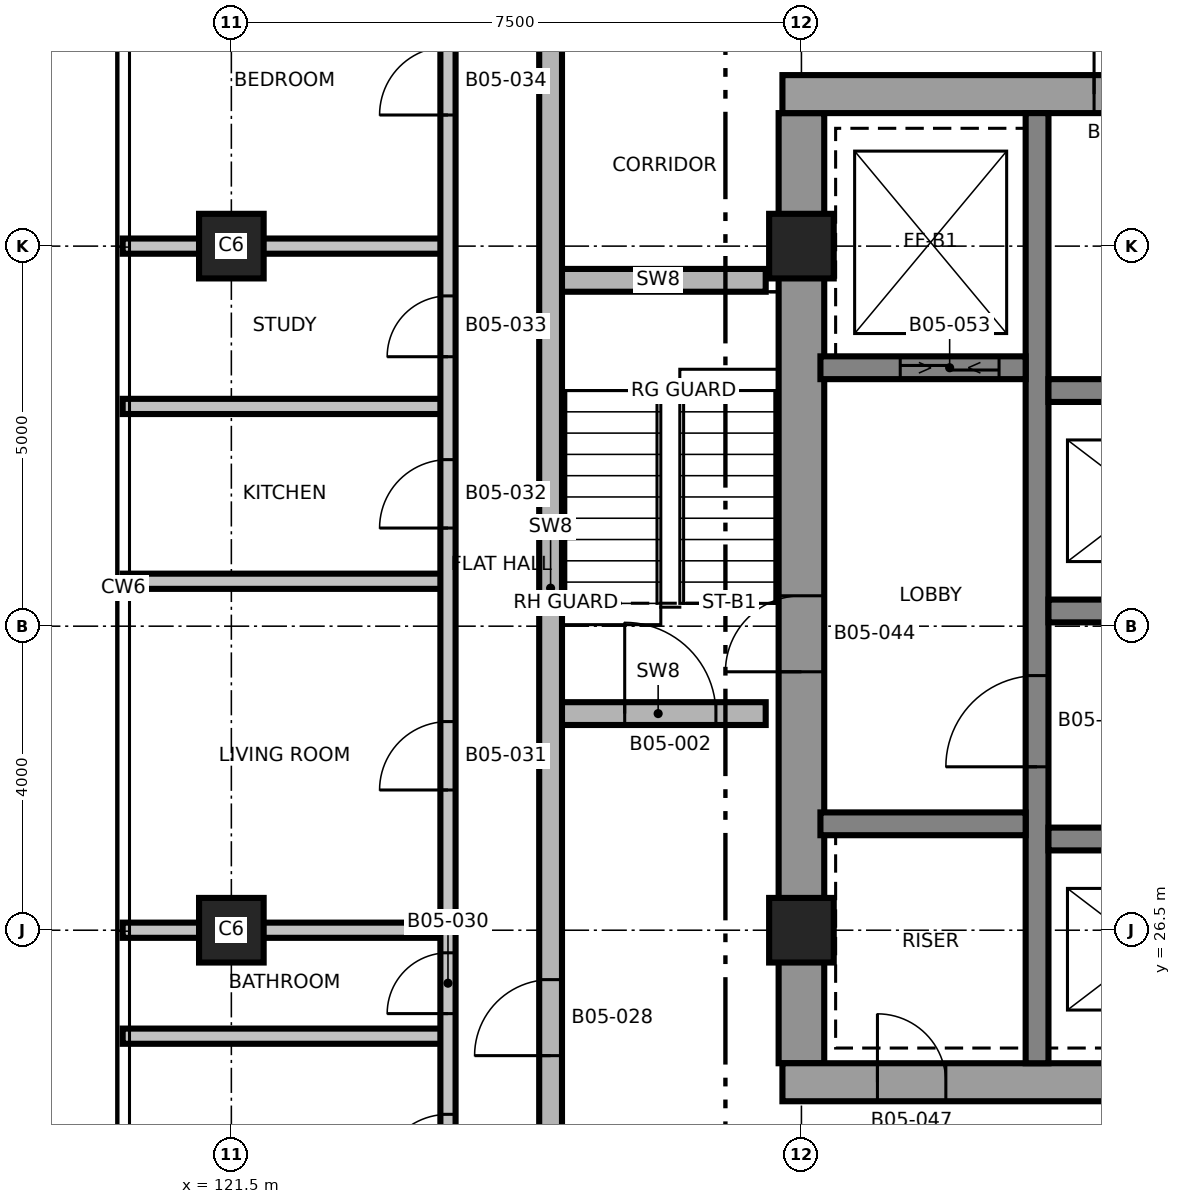
"""IFC4 building model, lengths in metres.
Left out: names, types, materials, properties, quantities, classifications, styles, units other than length and angle.
Written with IfcOpenShell. Run it as: python <this file> out.ifc"""

import sys

from ifc_helpers import new_model, si_unit, direction, frame, frame_2d, origin, origin_2d, place, context, subcontext, project, spatial, rectangle, extrude, element, fill, save


model = new_model("IFC4")
c1 = context("Model", 3, precision=1e-05, world=origin(), true_north=direction((0.0, 1.0)))
c2 = subcontext(c1, "Body", "Model", "MODEL_VIEW")
j1 = project(units=[si_unit("LENGTHUNIT", "METRE"), si_unit("PLANEANGLEUNIT", "RADIAN")], contexts=[c1])
p1 = place(None, origin())
s1 = spatial("IfcSite", under=j1, at=p1, CompositionType="ELEMENT")
p2 = place(p1, origin())
s2 = spatial("IfcBuilding", under=s1, at=p2, CompositionType="ELEMENT")
p3 = place(p2, frame((0.0, 0.0, 70.5)))
s3 = spatial("IfcBuildingStorey", under=s2, at=p3, CompositionType="ELEMENT", Elevation=70.5)
p4 = place(p3, frame((129.0, 24.75, 0.0), z_axis=(0.0, 0.0, 1.0), x_axis=(0.0, 1.0, 0.0)))
e1 = element("IfcWall", 1, at=p4, inside=s3, PredefinedType="SHEAR", context=c2, shape_type="SweptSolid", body=[
    extrude(rectangle(XDim=12.5, YDim=0.6, at=frame_2d((6.25, 0.0))), origin(), (0.0, 0.0, 1.0), 3.7),
])
p5 = place(p4, frame((5.15, 0.0, 0.0)))
e2 = element("IfcOpeningElement", 2, at=p5, cuts=e1, PredefinedType="OPENING", context=c2, shape_type="SweptSolid", body=[
    extrude(rectangle(XDim=1.0, YDim=2.1, at=frame_2d((0.5, 1.05))), frame((0.0, 0.31, 0.0), z_axis=(0.0, -1.0, 0.0), x_axis=(1.0, 0.0, 0.0)), (0.0, 0.0, 1.0), 0.62),
])
p6 = place(p3, frame((128.75, 24.5, 0.0), z_axis=(0.0, 0.0, 1.0), x_axis=(1.0, 0.0, 0.0)))
e3 = element("IfcWall", 3, at=p6, inside=s3, PredefinedType="SHEAR", context=c2, shape_type="SweptSolid", body=[
    extrude(rectangle(XDim=15.0, YDim=0.5, at=frame_2d((7.5, 0.0))), origin(), (0.0, 0.0, 1.0), 3.7),
])
p7 = place(p6, frame((9.65, 0.0, 0.0)))
e4 = element("IfcOpeningElement", 4, at=p7, cuts=e3, PredefinedType="OPENING", context=c2, shape_type="SweptSolid", body=[
    extrude(rectangle(XDim=1.5, YDim=2.1, at=frame_2d((0.75, 1.05))), frame((0.0, 0.26, 0.0), z_axis=(0.0, -1.0, 0.0), x_axis=(1.0, 0.0, 0.0)), (0.0, 0.0, 1.0), 0.52),
])
p8 = place(p6, frame((1.25, 0.0, 0.0)))
e5 = element("IfcOpeningElement", 5, at=p8, cuts=e3, PredefinedType="OPENING", context=c2, shape_type="SweptSolid", body=[
    extrude(rectangle(XDim=0.9, YDim=2.1, at=frame_2d((0.45, 1.05))), frame((0.0, 0.26, 0.0), z_axis=(0.0, -1.0, 0.0), x_axis=(1.0, 0.0, 0.0)), (0.0, 0.0, 1.0), 0.52),
])
p9 = place(p3, frame((128.75, 37.5, 0.0), z_axis=(0.0, 0.0, 1.0), x_axis=(1.0, 0.0, 0.0)))
e6 = element("IfcWall", 6, at=p9, inside=s3, PredefinedType="SHEAR", context=c2, shape_type="SweptSolid", body=[
    extrude(rectangle(XDim=15.0, YDim=0.5, at=frame_2d((7.5, 0.0))), origin(), (0.0, 0.0, 1.0), 3.7),
])
p10 = place(p9, frame((9.65, 0.0, 0.0)))
e7 = element("IfcOpeningElement", 7, at=p10, cuts=e6, PredefinedType="OPENING", context=c2, shape_type="SweptSolid", body=[
    extrude(rectangle(XDim=1.5, YDim=2.1, at=frame_2d((0.75, 1.05))), frame((0.0, 0.26, 0.0), z_axis=(0.0, -1.0, 0.0), x_axis=(1.0, 0.0, 0.0)), (0.0, 0.0, 1.0), 0.52),
])
p11 = place(p9, frame((12.85, 0.0, 0.0)))
e8 = element("IfcOpeningElement", 8, at=p11, cuts=e6, PredefinedType="OPENING", context=c2, shape_type="SweptSolid", body=[
    extrude(rectangle(XDim=0.9, YDim=2.1, at=frame_2d((0.45, 1.05))), frame((0.0, 0.26, 0.0), z_axis=(0.0, -1.0, 0.0), x_axis=(1.0, 0.0, 0.0)), (0.0, 0.0, 1.0), 0.52),
])
p12 = place(p9, frame((4.1, 0.0, 0.0)))
e9 = element("IfcOpeningElement", 9, at=p12, cuts=e6, PredefinedType="OPENING", context=c2, shape_type="SweptSolid", body=[
    extrude(rectangle(XDim=0.9, YDim=2.1, at=frame_2d((0.45, 1.05))), frame((0.0, 0.26, 0.0), z_axis=(0.0, -1.0, 0.0), x_axis=(1.0, 0.0, 0.0)), (0.0, 0.0, 1.0), 0.52),
])
p13 = place(p9, frame((7.0, 0.0, 0.0)))
e10 = element("IfcOpeningElement", 10, at=p13, cuts=e6, PredefinedType="OPENING", context=c2, shape_type="SweptSolid", body=[
    extrude(rectangle(XDim=0.9, YDim=2.1, at=frame_2d((0.45, 1.05))), frame((0.0, 0.26, 0.0), z_axis=(0.0, -1.0, 0.0), x_axis=(1.0, 0.0, 0.0)), (0.0, 0.0, 1.0), 0.52),
])
p14 = place(p3, frame((132.1, 24.75, 0.0), z_axis=(0.0, 0.0, 1.0), x_axis=(0.0, 1.0, 0.0)))
e11 = element("IfcWall", 11, at=p14, inside=s3, PredefinedType="SHEAR", context=c2, shape_type="SweptSolid", body=[
    extrude(rectangle(XDim=12.5, YDim=0.3, at=frame_2d((6.25, 0.0))), origin(), (0.0, 0.0, 1.0), 3.7),
])
p15 = place(p14, frame((3.9, 0.0, 0.0)))
e12 = element("IfcOpeningElement", 12, at=p15, cuts=e11, PredefinedType="OPENING", context=c2, shape_type="SweptSolid", body=[
    extrude(rectangle(XDim=1.2, YDim=2.1, at=frame_2d((0.6, 1.05))), frame((0.0, 0.16, 0.0), z_axis=(0.0, -1.0, 0.0), x_axis=(1.0, 0.0, 0.0)), (0.0, 0.0, 1.0), 0.32),
])
p16 = place(p3, frame((132.25, 27.7, 0.0), z_axis=(0.0, 0.0, 1.0), x_axis=(1.0, 0.0, 0.0)))
e13 = element("IfcWall", 13, at=p16, inside=s3, PredefinedType="SHEAR", context=c2, shape_type="SweptSolid", body=[
    extrude(rectangle(XDim=5.5, YDim=0.3, at=frame_2d((2.75, 0.0))), origin(), (0.0, 0.0, 1.0), 3.7),
])
p17 = place(p16, frame((0.9, 0.0, 0.0)))
e14 = element("IfcOpeningElement", 14, at=p17, cuts=e13, PredefinedType="OPENING", context=c2, shape_type="SweptSolid", body=[
    extrude(rectangle(XDim=1.1, YDim=2.4, at=frame_2d((0.55, 1.2))), frame((0.0, 0.16, 0.0), z_axis=(0.0, -1.0, 0.0), x_axis=(1.0, 0.0, 0.0)), (0.0, 0.0, 1.0), 0.32),
])
p18 = place(p16, frame((3.8, 0.0, 0.0)))
e15 = element("IfcOpeningElement", 15, at=p18, cuts=e13, PredefinedType="OPENING", context=c2, shape_type="SweptSolid", body=[
    extrude(rectangle(XDim=1.1, YDim=2.4, at=frame_2d((0.55, 1.2))), frame((0.0, 0.16, 0.0), z_axis=(0.0, -1.0, 0.0), x_axis=(1.0, 0.0, 0.0)), (0.0, 0.0, 1.0), 0.32),
])
p19 = place(p3, frame((132.25, 30.7, 0.0), z_axis=(0.0, 0.0, 1.0), x_axis=(1.0, 0.0, 0.0)))
e16 = element("IfcWall", 16, at=p19, inside=s3, PredefinedType="SHEAR", context=c2, shape_type="SweptSolid", body=[
    extrude(rectangle(XDim=5.5, YDim=0.3, at=frame_2d((2.75, 0.0))), origin(), (0.0, 0.0, 1.0), 3.7),
])
p20 = place(p19, frame((0.9, 0.0, 0.0)))
e17 = element("IfcOpeningElement", 17, at=p20, cuts=e16, PredefinedType="OPENING", context=c2, shape_type="SweptSolid", body=[
    extrude(rectangle(XDim=1.1, YDim=2.4, at=frame_2d((0.55, 1.2))), frame((0.0, 0.16, 0.0), z_axis=(0.0, -1.0, 0.0), x_axis=(1.0, 0.0, 0.0)), (0.0, 0.0, 1.0), 0.32),
])
p21 = place(p19, frame((3.8, 0.0, 0.0)))
e18 = element("IfcOpeningElement", 18, at=p21, cuts=e16, PredefinedType="OPENING", context=c2, shape_type="SweptSolid", body=[
    extrude(rectangle(XDim=1.1, YDim=2.4, at=frame_2d((0.55, 1.2))), frame((0.0, 0.16, 0.0), z_axis=(0.0, -1.0, 0.0), x_axis=(1.0, 0.0, 0.0)), (0.0, 0.0, 1.0), 0.32),
])
p22 = place(p3, frame((132.25, 33.6, 0.0), z_axis=(0.0, 0.0, 1.0), x_axis=(1.0, 0.0, 0.0)))
e19 = element("IfcWall", 19, at=p22, inside=s3, PredefinedType="SHEAR", context=c2, shape_type="SweptSolid", body=[
    extrude(rectangle(XDim=5.5, YDim=0.3, at=frame_2d((2.75, 0.0))), origin(), (0.0, 0.0, 1.0), 3.7),
])
p23 = place(p3, frame((129.25, 27.9, 0.0), z_axis=(0.0, 0.0, 1.0), x_axis=(1.0, 0.0, 0.0)))
e20 = element("IfcWall", 20, at=p23, inside=s3, PredefinedType="SHEAR", context=c2, shape_type="SweptSolid", body=[
    extrude(rectangle(XDim=2.7, YDim=0.3, at=frame_2d((1.35, 0.0))), origin(), (0.0, 0.0, 1.0), 3.7),
])
p24 = place(p3, frame((129.25, 33.9, 0.0), z_axis=(0.0, 0.0, 1.0), x_axis=(1.0, 0.0, 0.0)))
e21 = element("IfcWall", 21, at=p24, inside=s3, PredefinedType="SHEAR", context=c2, shape_type="SweptSolid", body=[
    extrude(rectangle(XDim=2.7, YDim=0.3, at=frame_2d((1.35, 0.0))), origin(), (0.0, 0.0, 1.0), 3.7),
])
p25 = place(p24, frame((1.05, 0.0, 0.0)))
e22 = element("IfcOpeningElement", 22, at=p25, cuts=e21, PredefinedType="OPENING", context=c2, shape_type="SweptSolid", body=[
    extrude(rectangle(XDim=1.3, YDim=2.4, at=frame_2d((0.65, 1.2))), frame((0.0, 0.16, 0.0), z_axis=(0.0, -1.0, 0.0), x_axis=(1.0, 0.0, 0.0)), (0.0, 0.0, 1.0), 0.32),
])
for number, where, z_axis, x_axis in (
    (23, (121.5, 26.5, 0.0), (0.0, 0.0, 1.0), (1.0, 0.0, 0.0)),
    (24, (129.0, 26.5, 0.0), (0.0, 0.0, 1.0), (1.0, 0.0, 0.0)),
    (25, (121.5, 35.5, 0.0), (0.0, 0.0, 1.0), (1.0, 0.0, 0.0)),
    (26, (129.0, 35.5, 0.0), (0.0, 0.0, 1.0), (1.0, 0.0, 0.0)),
):
    element("IfcColumn", number, at=place(p3, frame(where, z_axis=z_axis, x_axis=x_axis)), inside=s3, PredefinedType="COLUMN", context=c2, shape_type="SweptSolid", body=[
        extrude(rectangle(XDim=0.85, YDim=0.85, at=origin_2d()), origin(), (0.0, 0.0, 1.0), 3.7),
    ])
for number, where, z_axis, x_axis in (
    (27, (120.07, 25.106, 0.0), (0.0, 0.0, 1.0), (1.0, 0.0, 0.0)),
    (28, (120.07, 26.5, 0.0), (0.0, 0.0, 1.0), (1.0, 0.0, 0.0)),
):
    element("IfcWall", number, at=place(p3, frame(where, z_axis=z_axis, x_axis=x_axis)), inside=s3, PredefinedType="PARTITIONING", context=c2, shape_type="SweptSolid", body=[
        extrude(rectangle(XDim=4.28, YDim=0.2, at=frame_2d((2.14, 0.0))), origin(), (0.0, 0.0, 1.0), 3.4),
    ])
p26 = place(p3, frame((125.7, 29.35, 0.0), z_axis=(0.0, 0.0, 1.0), x_axis=(1.0, 0.0, 0.0)))
e29 = element("IfcWall", 29, at=p26, inside=s3, PredefinedType="SHEAR", context=c2, shape_type="SweptSolid", body=[
    extrude(rectangle(XDim=2.83, YDim=0.3, at=frame_2d((1.415, 0.0))), origin(), (0.0, 0.0, 1.0), 3.4),
])
p27 = place(p26, frame((0.975, 0.0, 0.0)))
e30 = element("IfcOpeningElement", 30, at=p27, cuts=e29, PredefinedType="OPENING", context=c2, shape_type="SweptSolid", body=[
    extrude(rectangle(XDim=1.2, YDim=2.1, at=frame_2d((0.6, 1.05))), frame((0.0, 0.16, 0.0), z_axis=(0.0, -1.0, 0.0), x_axis=(1.0, 0.0, 0.0)), (0.0, 0.0, 1.0), 0.32),
])
for number, where, z_axis, x_axis in (
    (31, (120.07, 31.091, 0.0), (0.0, 0.0, 1.0), (1.0, 0.0, 0.0)),
    (32, (120.07, 33.391, 0.0), (0.0, 0.0, 1.0), (1.0, 0.0, 0.0)),
):
    element("IfcWall", number, at=place(p3, frame(where, z_axis=z_axis, x_axis=x_axis)), inside=s3, PredefinedType="PARTITIONING", context=c2, shape_type="SweptSolid", body=[
        extrude(rectangle(XDim=4.28, YDim=0.2, at=frame_2d((2.14, 0.0))), origin(), (0.0, 0.0, 1.0), 3.4),
    ])
p28 = place(p3, frame((125.7, 35.05, 0.0), z_axis=(0.0, 0.0, 1.0), x_axis=(1.0, 0.0, 0.0)))
e33 = element("IfcWall", 33, at=p28, inside=s3, PredefinedType="SHEAR", context=c2, shape_type="SweptSolid", body=[
    extrude(rectangle(XDim=2.83, YDim=0.3, at=frame_2d((1.415, 0.0))), origin(), (0.0, 0.0, 1.0), 3.4),
])
p29 = place(p3, frame((120.07, 35.5, 0.0), z_axis=(0.0, 0.0, 1.0), x_axis=(1.0, 0.0, 0.0)))
e34 = element("IfcWall", 34, at=p29, inside=s3, PredefinedType="PARTITIONING", context=c2, shape_type="SweptSolid", body=[
    extrude(rectangle(XDim=4.28, YDim=0.2, at=frame_2d((2.14, 0.0))), origin(), (0.0, 0.0, 1.0), 3.4),
])
p30 = place(p3, frame((124.35, 22.15, 0.0), z_axis=(0.0, 0.0, 1.0), x_axis=(0.0, 1.0, 0.0)))
e35 = element("IfcWall", 35, at=p30, inside=s3, PredefinedType="PARTITIONING", context=c2, shape_type="SweptSolid", body=[
    extrude(rectangle(XDim=17.7, YDim=0.2, at=frame_2d((8.85, 0.0))), origin(), (0.0, 0.0, 1.0), 3.4),
])
p31 = place(p30, frame((1.028, 0.0, 0.0)))
e36 = element("IfcOpeningElement", 36, at=p31, cuts=e35, PredefinedType="OPENING", context=c2, shape_type="SweptSolid", body=[
    extrude(rectangle(XDim=0.9, YDim=2.1, at=frame_2d((0.45, 1.05))), frame((0.0, 0.11, 0.0), z_axis=(0.0, -1.0, 0.0), x_axis=(1.0, 0.0, 0.0)), (0.0, 0.0, 1.0), 0.22),
])
p32 = place(p30, frame((3.253, 0.0, 0.0)))
e37 = element("IfcOpeningElement", 37, at=p32, cuts=e35, PredefinedType="OPENING", context=c2, shape_type="SweptSolid", body=[
    extrude(rectangle(XDim=0.8, YDim=2.1, at=frame_2d((0.4, 1.05))), frame((0.0, 0.11, 0.0), z_axis=(0.0, -1.0, 0.0), x_axis=(1.0, 0.0, 0.0)), (0.0, 0.0, 1.0), 0.22),
])
p33 = place(p30, frame((6.195, 0.0, 0.0)))
e38 = element("IfcOpeningElement", 38, at=p33, cuts=e35, PredefinedType="OPENING", context=c2, shape_type="SweptSolid", body=[
    extrude(rectangle(XDim=0.9, YDim=2.1, at=frame_2d((0.45, 1.05))), frame((0.0, 0.11, 0.0), z_axis=(0.0, -1.0, 0.0), x_axis=(1.0, 0.0, 0.0)), (0.0, 0.0, 1.0), 0.22),
])
p34 = place(p30, frame((9.641, 0.0, 0.0)))
e39 = element("IfcOpeningElement", 39, at=p34, cuts=e35, PredefinedType="OPENING", context=c2, shape_type="SweptSolid", body=[
    extrude(rectangle(XDim=0.9, YDim=2.1, at=frame_2d((0.45, 1.05))), frame((0.0, 0.11, 0.0), z_axis=(0.0, -1.0, 0.0), x_axis=(1.0, 0.0, 0.0)), (0.0, 0.0, 1.0), 0.22),
])
p35 = place(p30, frame((11.895, 0.0, 0.0)))
e40 = element("IfcOpeningElement", 40, at=p35, cuts=e35, PredefinedType="OPENING", context=c2, shape_type="SweptSolid", body=[
    extrude(rectangle(XDim=0.8, YDim=2.1, at=frame_2d((0.4, 1.05))), frame((0.0, 0.11, 0.0), z_axis=(0.0, -1.0, 0.0), x_axis=(1.0, 0.0, 0.0)), (0.0, 0.0, 1.0), 0.22),
])
p36 = place(p30, frame((15.075, 0.0, 0.0)))
e41 = element("IfcOpeningElement", 41, at=p36, cuts=e35, PredefinedType="OPENING", context=c2, shape_type="SweptSolid", body=[
    extrude(rectangle(XDim=0.9, YDim=2.1, at=frame_2d((0.45, 1.05))), frame((0.0, 0.11, 0.0), z_axis=(0.0, -1.0, 0.0), x_axis=(1.0, 0.0, 0.0)), (0.0, 0.0, 1.0), 0.22),
])
p37 = place(p3, frame((125.7, 22.15, 0.0), z_axis=(0.0, 0.0, 1.0), x_axis=(0.0, 1.0, 0.0)))
e42 = element("IfcWall", 42, at=p37, inside=s3, PredefinedType="SHEAR", context=c2, shape_type="SweptSolid", body=[
    extrude(rectangle(XDim=17.7, YDim=0.3, at=frame_2d((8.85, 0.0))), origin(), (0.0, 0.0, 1.0), 3.4),
])
p38 = place(p37, frame((2.7, 0.0, 0.0)))
e43 = element("IfcOpeningElement", 43, at=p38, cuts=e42, PredefinedType="OPENING", context=c2, shape_type="SweptSolid", body=[
    extrude(rectangle(XDim=1.0, YDim=2.1, at=frame_2d((0.5, 1.05))), frame((0.0, 0.16, 0.0), z_axis=(0.0, -1.0, 0.0), x_axis=(1.0, 0.0, 0.0)), (0.0, 0.0, 1.0), 0.32),
])
p39 = place(p27, origin())
e44 = element("IfcDoor", 44, at=p39, inside=s3, OperationType="SINGLE_SWING_RIGHT", PredefinedType="DOOR", context=c2, shape_type="SweptSolid", body=[
    extrude(rectangle(XDim=1.2, YDim=2.1, at=frame_2d((0.6, 1.05))), frame((0.0, 0.025, 0.0), z_axis=(0.0, -1.0, 0.0), x_axis=(1.0, 0.0, 0.0)), (0.0, 0.0, 1.0), 0.05),
])
fill(e30, e44)
p40 = place(p38, origin())
e45 = element("IfcDoor", 45, at=p40, inside=s3, OperationType="SINGLE_SWING_RIGHT", PredefinedType="DOOR", context=c2, shape_type="SweptSolid", body=[
    extrude(rectangle(XDim=1.0, YDim=2.1, at=frame_2d((0.5, 1.05))), frame((0.0, 0.025, 0.0), z_axis=(0.0, -1.0, 0.0), x_axis=(1.0, 0.0, 0.0)), (0.0, 0.0, 1.0), 0.05),
])
fill(e43, e45)
p41 = place(p31, origin())
e46 = element("IfcDoor", 46, at=p41, inside=s3, OperationType="SINGLE_SWING_LEFT", PredefinedType="DOOR", context=c2, shape_type="SweptSolid", body=[
    extrude(rectangle(XDim=0.9, YDim=2.1, at=frame_2d((0.45, 1.05))), frame((0.0, 0.025, 0.0), z_axis=(0.0, -1.0, 0.0), x_axis=(1.0, 0.0, 0.0)), (0.0, 0.0, 1.0), 0.05),
])
fill(e36, e46)
p42 = place(p32, origin())
e47 = element("IfcDoor", 47, at=p42, inside=s3, OperationType="SINGLE_SWING_RIGHT", PredefinedType="DOOR", context=c2, shape_type="SweptSolid", body=[
    extrude(rectangle(XDim=0.8, YDim=2.1, at=frame_2d((0.4, 1.05))), frame((0.0, 0.025, 0.0), z_axis=(0.0, -1.0, 0.0), x_axis=(1.0, 0.0, 0.0)), (0.0, 0.0, 1.0), 0.05),
])
fill(e37, e47)
p43 = place(p33, origin())
e48 = element("IfcDoor", 48, at=p43, inside=s3, OperationType="SINGLE_SWING_LEFT", PredefinedType="DOOR", context=c2, shape_type="SweptSolid", body=[
    extrude(rectangle(XDim=0.9, YDim=2.1, at=frame_2d((0.45, 1.05))), frame((0.0, 0.025, 0.0), z_axis=(0.0, -1.0, 0.0), x_axis=(1.0, 0.0, 0.0)), (0.0, 0.0, 1.0), 0.05),
])
fill(e38, e48)
p44 = place(p34, origin())
e49 = element("IfcDoor", 49, at=p44, inside=s3, OperationType="SINGLE_SWING_RIGHT", PredefinedType="DOOR", context=c2, shape_type="SweptSolid", body=[
    extrude(rectangle(XDim=0.9, YDim=2.1, at=frame_2d((0.45, 1.05))), frame((0.0, 0.025, 0.0), z_axis=(0.0, -1.0, 0.0), x_axis=(1.0, 0.0, 0.0)), (0.0, 0.0, 1.0), 0.05),
])
fill(e39, e49)
p45 = place(p35, origin())
e50 = element("IfcDoor", 50, at=p45, inside=s3, OperationType="SINGLE_SWING_LEFT", PredefinedType="DOOR", context=c2, shape_type="SweptSolid", body=[
    extrude(rectangle(XDim=0.8, YDim=2.1, at=frame_2d((0.4, 1.05))), frame((0.0, 0.025, 0.0), z_axis=(0.0, -1.0, 0.0), x_axis=(1.0, 0.0, 0.0)), (0.0, 0.0, 1.0), 0.05),
])
fill(e40, e50)
p46 = place(p36, origin())
e51 = element("IfcDoor", 51, at=p46, inside=s3, OperationType="SINGLE_SWING_RIGHT", PredefinedType="DOOR", context=c2, shape_type="SweptSolid", body=[
    extrude(rectangle(XDim=0.9, YDim=2.1, at=frame_2d((0.45, 1.05))), frame((0.0, 0.025, 0.0), z_axis=(0.0, -1.0, 0.0), x_axis=(1.0, 0.0, 0.0)), (0.0, 0.0, 1.0), 0.05),
])
fill(e41, e51)
p47 = place(p15, origin())
e52 = element("IfcDoor", 52, at=p47, inside=s3, OperationType="SINGLE_SWING_LEFT", PredefinedType="DOOR", context=c2, shape_type="SweptSolid", body=[
    extrude(rectangle(XDim=1.2, YDim=2.1, at=frame_2d((0.6, 1.05))), frame((0.0, 0.025, 0.0), z_axis=(0.0, -1.0, 0.0), x_axis=(1.0, 0.0, 0.0)), (0.0, 0.0, 1.0), 0.05),
])
fill(e12, e52)
p48 = place(p5, origin())
e53 = element("IfcDoor", 53, at=p48, inside=s3, OperationType="SINGLE_SWING_RIGHT", PredefinedType="DOOR", context=c2, shape_type="SweptSolid", body=[
    extrude(rectangle(XDim=1.0, YDim=2.1, at=frame_2d((0.5, 1.05))), frame((0.0, 0.025, 0.0), z_axis=(0.0, -1.0, 0.0), x_axis=(1.0, 0.0, 0.0)), (0.0, 0.0, 1.0), 0.05),
])
fill(e2, e53)
p49 = place(p8, origin())
e54 = element("IfcDoor", 54, at=p49, inside=s3, OperationType="SINGLE_SWING_LEFT", PredefinedType="DOOR", context=c2, shape_type="SweptSolid", body=[
    extrude(rectangle(XDim=0.9, YDim=2.1, at=frame_2d((0.45, 1.05))), frame((0.0, 0.025, 0.0), z_axis=(0.0, -1.0, 0.0), x_axis=(1.0, 0.0, 0.0)), (0.0, 0.0, 1.0), 0.05),
])
fill(e5, e54)
p50 = place(p25, origin())
e55 = element("IfcDoor", 55, at=p50, inside=s3, OperationType="SLIDING_TO_LEFT", PredefinedType="DOOR", context=c2, shape_type="SweptSolid", body=[
    extrude(rectangle(XDim=1.3, YDim=2.4, at=frame_2d((0.65, 1.2))), frame((0.0, 0.025, 0.0), z_axis=(0.0, -1.0, 0.0), x_axis=(1.0, 0.0, 0.0)), (0.0, 0.0, 1.0), 0.05),
])
fill(e22, e55)
p51 = place(p12, origin())
e56 = element("IfcDoor", 56, at=p51, inside=s3, OperationType="SINGLE_SWING_LEFT", PredefinedType="DOOR", context=c2, shape_type="SweptSolid", body=[
    extrude(rectangle(XDim=0.9, YDim=2.1, at=frame_2d((0.45, 1.05))), frame((0.0, 0.025, 0.0), z_axis=(0.0, -1.0, 0.0), x_axis=(1.0, 0.0, 0.0)), (0.0, 0.0, 1.0), 0.05),
])
fill(e9, e56)
save(model, sys.argv[1])
